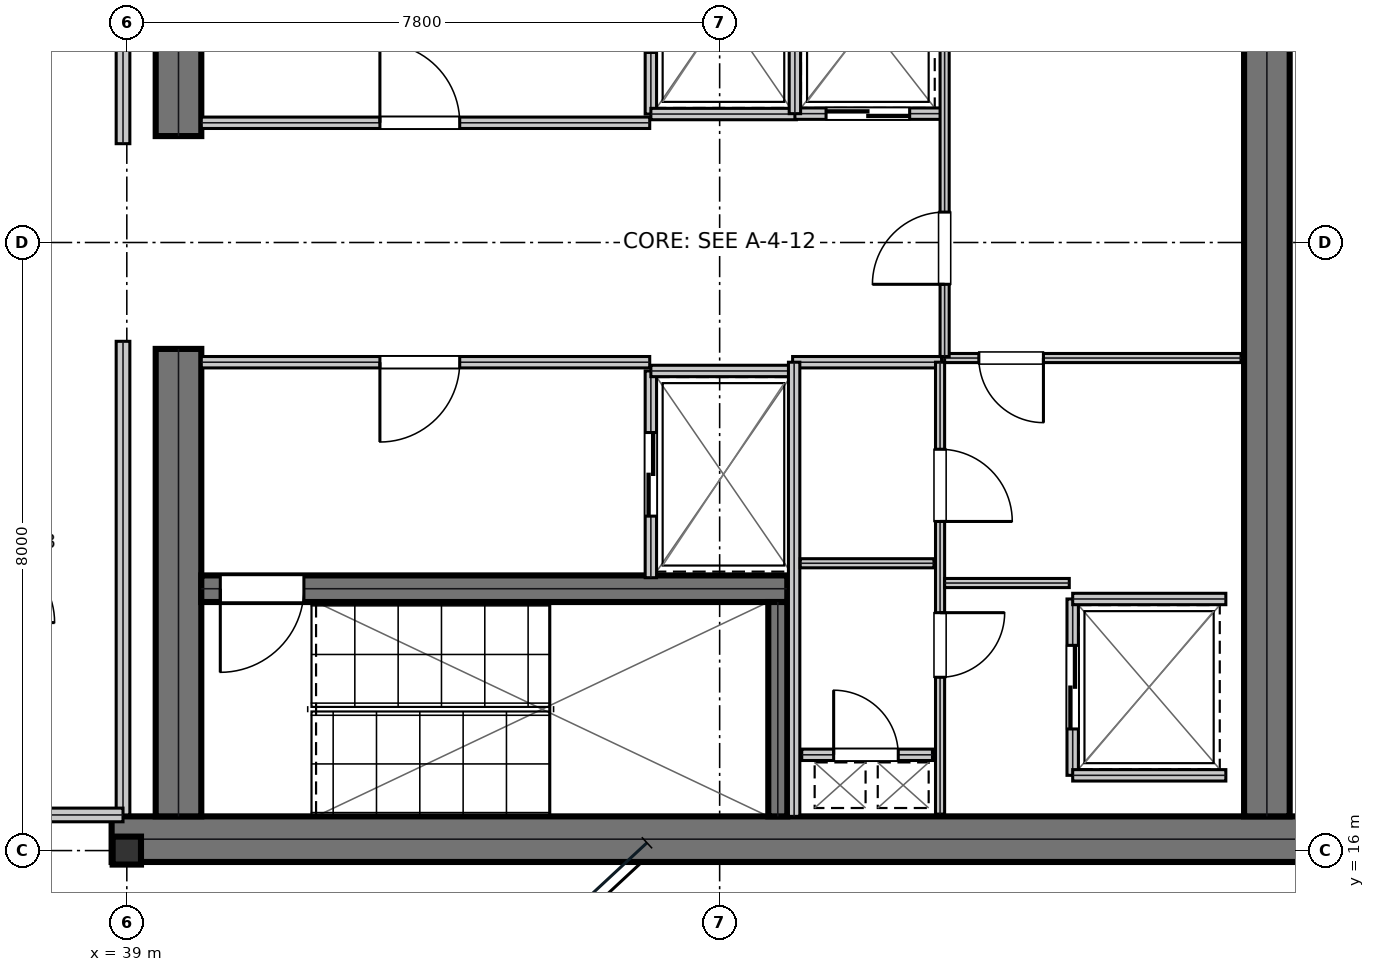
"""IFC4 building model, lengths in metres.
Left out: names, types, materials, properties, quantities, classifications, styles, units other than length and angle.
Written with IfcOpenShell. Run it as: python <this file> out.ifc"""

import sys

from ifc_helpers import new_model, si_unit, direction, frame, frame_2d, origin, origin_2d, place, context, subcontext, project, spatial, rectangle, i_section, extrude, element, fill, save


model = new_model("IFC4")
c1 = context("Model", 3, precision=1e-05, world=origin(), true_north=direction((0.0, 1.0)))
c2 = subcontext(c1, "Body", "Model", "MODEL_VIEW")
j1 = project(units=[si_unit("LENGTHUNIT", "METRE"), si_unit("PLANEANGLEUNIT", "RADIAN")], contexts=[c1])
p1 = place(None, origin())
s1 = spatial("IfcSite", under=j1, at=p1, CompositionType="ELEMENT")
p2 = place(p1, origin())
s2 = spatial("IfcBuilding", under=s1, at=p2, CompositionType="ELEMENT")
p3 = place(p2, frame((0.0, 0.0, 323.55)))
s3 = spatial("IfcBuildingStorey", under=s2, at=p3, CompositionType="ELEMENT", Elevation=323.55)
p4 = place(p3, frame((38.8, 16.15, 0.0), z_axis=(0.0, 0.0, 1.0), x_axis=(1.0, 0.0, 0.0)))
e1 = element("IfcWall", 1, at=p4, inside=s3, PredefinedType="SHEAR", context=c2, shape_type="SweptSolid", body=[
    extrude(rectangle(XDim=16.0, YDim=0.6, at=frame_2d((8.0, 0.0))), origin(), (0.0, 0.0, 1.0), 3.77),
])
for number, where, z_axis, x_axis in (
    (2, (39.68, 16.45, 0.0), (0.0, 0.0, 1.0), (0.0, 1.0, 0.0)),
    (3, (39.68, 25.4, 0.0), (0.0, 0.0, 1.0), (0.0, 1.0, 0.0)),
):
    element("IfcWall", number, at=place(p3, frame(where, z_axis=z_axis, x_axis=x_axis)), inside=s3, PredefinedType="SHEAR", context=c2, shape_type="SweptSolid", body=[
        extrude(rectangle(XDim=6.15, YDim=0.6, at=frame_2d((3.075, 0.0))), origin(), (0.0, 0.0, 1.0), 3.77),
    ])
p5 = place(p3, frame((54.0, 16.45, 0.0), z_axis=(0.0, 0.0, 1.0), x_axis=(0.0, 1.0, 0.0)))
e4 = element("IfcWall", 4, at=p5, inside=s3, PredefinedType="SHEAR", context=c2, shape_type="SweptSolid", body=[
    extrude(rectangle(XDim=15.1, YDim=0.6, at=frame_2d((7.55, 0.0))), origin(), (0.0, 0.0, 1.0), 3.77),
])
p6 = place(p3, frame((39.98, 19.445, 0.0), z_axis=(0.0, 0.0, 1.0), x_axis=(1.0, 0.0, 0.0)))
e5 = element("IfcWall", 5, at=p6, inside=s3, PredefinedType="SHEAR", context=c2, shape_type="SweptSolid", body=[
    extrude(rectangle(XDim=7.71, YDim=0.35, at=frame_2d((3.855, 0.0))), origin(), (0.0, 0.0, 1.0), 3.77),
])
p7 = place(p6, frame((0.25, 0.0, 0.0)))
e6 = element("IfcOpeningElement", 6, at=p7, cuts=e5, PredefinedType="OPENING", context=c2, shape_type="SweptSolid", body=[
    extrude(rectangle(XDim=1.1, YDim=2.15, at=frame_2d((0.55, 1.075))), frame((0.0, 0.185, 0.0), z_axis=(0.0, -1.0, 0.0), x_axis=(1.0, 0.0, 0.0)), (0.0, 0.0, 1.0), 0.37),
])
p8 = place(p3, frame((47.565, 16.45, 0.0), z_axis=(0.0, 0.0, 1.0), x_axis=(0.0, 1.0, 0.0)))
e7 = element("IfcWall", 7, at=p8, inside=s3, PredefinedType="SHEAR", context=c2, shape_type="SweptSolid", body=[
    extrude(rectangle(XDim=2.82, YDim=0.25, at=frame_2d((1.41, 0.0))), origin(), (0.0, 0.0, 1.0), 3.77),
])
p9 = place(p3, frame((39.0, 16.0, 0.0), z_axis=(0.0, 0.0, 1.0), x_axis=(1.0, 0.0, 0.0)))
e8 = element("IfcColumn", 8, at=p9, inside=s3, PredefinedType="COLUMN", context=c2, shape_type="SweptSolid", body=[
    extrude(i_section(OverallWidth=0.373, OverallDepth=0.368, WebThickness=0.015, FlangeThickness=0.024, at=origin_2d()), origin(), (0.0, 0.0, 1.0), 4.044),
])
p10 = place(p3, frame((39.98, 25.575, 0.0), z_axis=(0.0, 0.0, 1.0), x_axis=(1.0, 0.0, 0.0)))
e9 = element("IfcWall", 9, at=p10, inside=s3, PredefinedType="PARTITIONING", context=c2, shape_type="SweptSolid", body=[
    extrude(rectangle(XDim=5.9, YDim=0.15, at=frame_2d((2.95, 0.0))), origin(), (0.0, 0.0, 1.0), 3.77),
])
p11 = place(p10, frame((2.35, 0.0, 0.0)))
e10 = element("IfcOpeningElement", 10, at=p11, cuts=e9, PredefinedType="OPENING", context=c2, shape_type="SweptSolid", body=[
    extrude(rectangle(XDim=1.05, YDim=2.15, at=frame_2d((0.525, 1.075))), frame((0.0, 0.085, 0.0), z_axis=(0.0, -1.0, 0.0), x_axis=(1.0, 0.0, 0.0)), (0.0, 0.0, 1.0), 0.17),
])
p12 = place(p3, frame((39.98, 22.425, 0.0), z_axis=(0.0, 0.0, 1.0), x_axis=(1.0, 0.0, 0.0)))
e11 = element("IfcWall", 11, at=p12, inside=s3, PredefinedType="PARTITIONING", context=c2, shape_type="SweptSolid", body=[
    extrude(rectangle(XDim=5.9, YDim=0.15, at=frame_2d((2.95, 0.0))), origin(), (0.0, 0.0, 1.0), 3.77),
])
p13 = place(p12, frame((2.35, 0.0, 0.0)))
e12 = element("IfcOpeningElement", 12, at=p13, cuts=e11, PredefinedType="OPENING", context=c2, shape_type="SweptSolid", body=[
    extrude(rectangle(XDim=1.05, YDim=2.15, at=frame_2d((0.525, 1.075))), frame((0.0, 0.085, 0.0), z_axis=(0.0, -1.0, 0.0), x_axis=(1.0, 0.0, 0.0)), (0.0, 0.0, 1.0), 0.17),
])
p14 = place(p3, frame((45.895, 25.69, 0.0), z_axis=(0.0, 0.0, 1.0), x_axis=(0.0, 1.0, 0.0)))
e13 = element("IfcWall", 13, at=p14, inside=s3, PredefinedType="PARTITIONING", context=c2, shape_type="SweptSolid", body=[
    extrude(rectangle(XDim=2.72, YDim=0.15, at=frame_2d((1.36, 0.0))), origin(), (0.0, 0.0, 1.0), 3.77),
])
p15 = place(p14, frame((0.81, 0.0, 0.0)))
e14 = element("IfcOpeningElement", 14, at=p15, cuts=e13, PredefinedType="OPENING", context=c2, shape_type="SweptSolid", body=[
    extrude(rectangle(XDim=1.1, YDim=2.15, at=frame_2d((0.55, 1.075))), frame((0.0, 0.085, 0.0), z_axis=(0.0, -1.0, 0.0), x_axis=(1.0, 0.0, 0.0)), (0.0, 0.0, 1.0), 0.17),
])
p16 = place(p3, frame((45.895, 25.69, 0.0), z_axis=(0.0, 0.0, 1.0), x_axis=(1.0, 0.0, 0.0)))
e15 = element("IfcWall", 15, at=p16, inside=s3, PredefinedType="PARTITIONING", context=c2, shape_type="SweptSolid", body=[
    extrude(rectangle(XDim=1.915, YDim=0.15, at=frame_2d((0.958, 0.0))), origin(), (0.0, 0.0, 1.0), 3.77),
])
p17 = place(p3, frame((45.895, 19.59, 0.0), z_axis=(0.0, 0.0, 1.0), x_axis=(0.0, 1.0, 0.0)))
e16 = element("IfcWall", 16, at=p17, inside=s3, PredefinedType="PARTITIONING", context=c2, shape_type="SweptSolid", body=[
    extrude(rectangle(XDim=2.72, YDim=0.15, at=frame_2d((1.36, 0.0))), origin(), (0.0, 0.0, 1.0), 3.77),
])
p18 = place(p17, frame((0.81, 0.0, 0.0)))
e17 = element("IfcOpeningElement", 17, at=p18, cuts=e16, PredefinedType="OPENING", context=c2, shape_type="SweptSolid", body=[
    extrude(rectangle(XDim=1.1, YDim=2.15, at=frame_2d((0.55, 1.075))), frame((0.0, 0.085, 0.0), z_axis=(0.0, -1.0, 0.0), x_axis=(1.0, 0.0, 0.0)), (0.0, 0.0, 1.0), 0.17),
])
p19 = place(p3, frame((45.895, 22.31, 0.0), z_axis=(0.0, 0.0, 1.0), x_axis=(1.0, 0.0, 0.0)))
e18 = element("IfcWall", 18, at=p19, inside=s3, PredefinedType="PARTITIONING", context=c2, shape_type="SweptSolid", body=[
    extrude(rectangle(XDim=1.915, YDim=0.15, at=frame_2d((0.958, 0.0))), origin(), (0.0, 0.0, 1.0), 3.77),
])
p20 = place(p3, frame((47.79, 25.695, 0.0), z_axis=(0.0, 0.0, 1.0), x_axis=(1.0, 0.0, 0.0)))
e19 = element("IfcWall", 19, at=p20, inside=s3, PredefinedType="PARTITIONING", context=c2, shape_type="SweptSolid", body=[
    extrude(rectangle(XDim=1.92, YDim=0.15, at=frame_2d((0.96, 0.0))), origin(), (0.0, 0.0, 1.0), 3.77),
])
p21 = place(p20, frame((0.41, 0.0, 0.0)))
e20 = element("IfcOpeningElement", 20, at=p21, cuts=e19, PredefinedType="OPENING", context=c2, shape_type="SweptSolid", body=[
    extrude(rectangle(XDim=1.1, YDim=2.15, at=frame_2d((0.55, 1.075))), frame((0.0, 0.085, 0.0), z_axis=(0.0, -1.0, 0.0), x_axis=(1.0, 0.0, 0.0)), (0.0, 0.0, 1.0), 0.17),
])
p22 = place(p3, frame((47.79, 25.695, 0.0), z_axis=(0.0, 0.0, 1.0), x_axis=(0.0, 1.0, 0.0)))
e21 = element("IfcWall", 21, at=p22, inside=s3, PredefinedType="PARTITIONING", context=c2, shape_type="SweptSolid", body=[
    extrude(rectangle(XDim=2.415, YDim=0.15, at=frame_2d((1.208, 0.0))), origin(), (0.0, 0.0, 1.0), 3.77),
])
p23 = place(p3, frame((51.445, 16.99, 0.0), z_axis=(0.0, 0.0, 1.0), x_axis=(0.0, 1.0, 0.0)))
e22 = element("IfcWall", 22, at=p23, inside=s3, PredefinedType="PARTITIONING", context=c2, shape_type="SweptSolid", body=[
    extrude(rectangle(XDim=2.32, YDim=0.15, at=frame_2d((1.16, 0.0))), origin(), (0.0, 0.0, 1.0), 3.77),
])
p24 = place(p23, frame((0.61, 0.0, 0.0)))
e23 = element("IfcOpeningElement", 23, at=p24, cuts=e22, PredefinedType="OPENING", context=c2, shape_type="SweptSolid", body=[
    extrude(rectangle(XDim=1.1, YDim=2.15, at=frame_2d((0.55, 1.075))), frame((0.0, 0.085, 0.0), z_axis=(0.0, -1.0, 0.0), x_axis=(1.0, 0.0, 0.0)), (0.0, 0.0, 1.0), 0.17),
])
for number, where, z_axis, x_axis in (
    (24, (51.445, 16.99, 0.0), (0.0, 0.0, 1.0), (1.0, 0.0, 0.0)),
    (25, (51.445, 19.31, 0.0), (0.0, 0.0, 1.0), (1.0, 0.0, 0.0)),
):
    element("IfcWall", number, at=place(p3, frame(where, z_axis=z_axis, x_axis=x_axis)), inside=s3, PredefinedType="PARTITIONING", context=c2, shape_type="SweptSolid", body=[
        extrude(rectangle(XDim=2.015, YDim=0.15, at=frame_2d((1.007, 0.0))), origin(), (0.0, 0.0, 1.0), 3.77),
    ])
p25 = place(p3, frame((47.88, 17.26, 0.0), z_axis=(0.0, 0.0, 1.0), x_axis=(1.0, 0.0, 0.0)))
e26 = element("IfcWall", 26, at=p25, inside=s3, PredefinedType="PARTITIONING", context=c2, shape_type="SweptSolid", body=[
    extrude(rectangle(XDim=1.72, YDim=0.15, at=frame_2d((0.86, 0.0))), origin(), (0.0, 0.0, 1.0), 3.77),
])
p26 = place(p25, frame((0.42, 0.0, 0.0)))
e27 = element("IfcOpeningElement", 27, at=p26, cuts=e26, PredefinedType="OPENING", context=c2, shape_type="SweptSolid", body=[
    extrude(rectangle(XDim=0.85, YDim=2.15, at=frame_2d((0.425, 1.075))), frame((0.0, 0.085, 0.0), z_axis=(0.0, -1.0, 0.0), x_axis=(1.0, 0.0, 0.0)), (0.0, 0.0, 1.0), 0.17),
])
p27 = place(p3, frame((47.76, 22.425, 0.0), z_axis=(0.0, 0.0, 1.0), x_axis=(1.0, 0.0, 0.0)))
e28 = element("IfcWall", 28, at=p27, inside=s3, PredefinedType="PARTITIONING", context=c2, shape_type="SweptSolid", body=[
    extrude(rectangle(XDim=1.96, YDim=0.15, at=frame_2d((0.98, 0.0))), origin(), (0.0, 0.0, 1.0), 3.77),
])
p28 = place(p3, frame((47.78, 16.45, 0.0), z_axis=(0.0, 0.0, 1.0), x_axis=(0.0, 1.0, 0.0)))
e29 = element("IfcWall", 29, at=p28, inside=s3, PredefinedType="PARTITIONING", context=c2, shape_type="SweptSolid", body=[
    extrude(rectangle(XDim=5.975, YDim=0.15, at=frame_2d((2.988, 0.0))), origin(), (0.0, 0.0, 1.0), 3.77),
])
p29 = place(p3, frame((47.86, 19.78, 0.0), z_axis=(0.0, 0.0, 1.0), x_axis=(1.0, 0.0, 0.0)))
e30 = element("IfcWall", 30, at=p29, inside=s3, PredefinedType="PARTITIONING", context=c2, shape_type="SweptSolid", body=[
    extrude(rectangle(XDim=1.76, YDim=0.12, at=frame_2d((0.88, 0.0))), origin(), (0.0, 0.0, 1.0), 3.77),
])
p30 = place(p3, frame((49.7, 16.48, 0.0), z_axis=(0.0, 0.0, 1.0), x_axis=(0.0, 1.0, 0.0)))
e31 = element("IfcWall", 31, at=p30, inside=s3, PredefinedType="PARTITIONING", context=c2, shape_type="SweptSolid", body=[
    extrude(rectangle(XDim=5.945, YDim=0.12, at=frame_2d((2.973, 0.0))), origin(), (0.0, 0.0, 1.0), 3.77),
])
p31 = place(p30, frame((1.8, 0.0, 0.0)))
e32 = element("IfcOpeningElement", 32, at=p31, cuts=e31, PredefinedType="OPENING", context=c2, shape_type="SweptSolid", body=[
    extrude(rectangle(XDim=0.85, YDim=2.15, at=frame_2d((0.425, 1.075))), frame((0.0, 0.07, 0.0), z_axis=(0.0, -1.0, 0.0), x_axis=(1.0, 0.0, 0.0)), (0.0, 0.0, 1.0), 0.14),
])
p32 = place(p30, frame((3.85, 0.0, 0.0)))
e33 = element("IfcOpeningElement", 33, at=p32, cuts=e31, PredefinedType="OPENING", context=c2, shape_type="SweptSolid", body=[
    extrude(rectangle(XDim=0.95, YDim=2.15, at=frame_2d((0.475, 1.075))), frame((0.0, 0.07, 0.0), z_axis=(0.0, -1.0, 0.0), x_axis=(1.0, 0.0, 0.0)), (0.0, 0.0, 1.0), 0.14),
])
p33 = place(p3, frame((49.76, 22.48, 0.0), z_axis=(0.0, 0.0, 1.0), x_axis=(1.0, 0.0, 0.0)))
e34 = element("IfcWall", 34, at=p33, inside=s3, PredefinedType="PARTITIONING", context=c2, shape_type="SweptSolid", body=[
    extrude(rectangle(XDim=3.9, YDim=0.12, at=frame_2d((1.95, 0.0))), origin(), (0.0, 0.0, 1.0), 3.77),
])
p34 = place(p33, frame((0.45, 0.0, 0.0)))
e35 = element("IfcOpeningElement", 35, at=p34, cuts=e34, PredefinedType="OPENING", context=c2, shape_type="SweptSolid", body=[
    extrude(rectangle(XDim=0.85, YDim=2.15, at=frame_2d((0.425, 1.075))), frame((0.0, 0.07, 0.0), z_axis=(0.0, -1.0, 0.0), x_axis=(1.0, 0.0, 0.0)), (0.0, 0.0, 1.0), 0.14),
])
p35 = place(p3, frame((49.76, 19.52, 0.0), z_axis=(0.0, 0.0, 1.0), x_axis=(1.0, 0.0, 0.0)))
e36 = element("IfcWall", 36, at=p35, inside=s3, PredefinedType="PARTITIONING", context=c2, shape_type="SweptSolid", body=[
    extrude(rectangle(XDim=1.64, YDim=0.12, at=frame_2d((0.82, 0.0))), origin(), (0.0, 0.0, 1.0), 3.77),
])
p36 = place(p3, frame((49.76, 22.5, 0.0), z_axis=(0.0, 0.0, 1.0), x_axis=(0.0, 1.0, 0.0)))
e37 = element("IfcWall", 37, at=p36, inside=s3, PredefinedType="PARTITIONING", context=c2, shape_type="SweptSolid", body=[
    extrude(rectangle(XDim=5.72, YDim=0.12, at=frame_2d((2.86, 0.0))), origin(), (0.0, 0.0, 1.0), 3.77),
])
p37 = place(p36, frame((0.95, 0.0, 0.0)))
e38 = element("IfcOpeningElement", 38, at=p37, cuts=e37, PredefinedType="OPENING", context=c2, shape_type="SweptSolid", body=[
    extrude(rectangle(XDim=0.95, YDim=2.15, at=frame_2d((0.475, 1.075))), frame((0.0, 0.07, 0.0), z_axis=(0.0, -1.0, 0.0), x_axis=(1.0, 0.0, 0.0)), (0.0, 0.0, 1.0), 0.14),
])
p38 = place(p3, frame((38.95, 16.469, 0.0), z_axis=(0.0, 0.0, 1.0), x_axis=(0.0, 1.0, 0.0)))
e39 = element("IfcWall", 39, at=p38, inside=s3, PredefinedType="SOLIDWALL", context=c2, shape_type="SweptSolid", body=[
    extrude(rectangle(XDim=6.231, YDim=0.18, at=frame_2d((3.116, 0.0))), origin(), (0.0, 0.0, 1.0), 3.5),
])
p39 = place(p3, frame((37.05, 16.469, 0.0), z_axis=(0.0, 0.0, 1.0), x_axis=(1.0, 0.0, 0.0)))
e40 = element("IfcWall", 40, at=p39, inside=s3, PredefinedType="SOLIDWALL", context=c2, shape_type="SweptSolid", body=[
    extrude(rectangle(XDim=1.9, YDim=0.18, at=frame_2d((0.95, 0.0))), origin(), (0.0, 0.0, 1.0), 3.77),
])
p40 = place(p3, frame((38.95, 25.3, 0.0), z_axis=(0.0, 0.0, 1.0), x_axis=(0.0, 1.0, 0.0)))
e41 = element("IfcWall", 41, at=p40, inside=s3, PredefinedType="SOLIDWALL", context=c2, shape_type="SweptSolid", body=[
    extrude(rectangle(XDim=6.231, YDim=0.18, at=frame_2d((3.116, 0.0))), origin(), (0.0, 0.0, 1.0), 3.5),
])
p41 = place(p11, origin())
e42 = element("IfcDoor", 42, at=p41, inside=s3, OperationType="SINGLE_SWING_LEFT", PredefinedType="DOOR", context=c2, shape_type="SweptSolid", body=[
    extrude(rectangle(XDim=1.05, YDim=2.15, at=frame_2d((0.525, 1.075))), frame((0.0, 0.025, 0.0), z_axis=(0.0, -1.0, 0.0), x_axis=(1.0, 0.0, 0.0)), (0.0, 0.0, 1.0), 0.05),
])
fill(e10, e42)
p42 = place(p13, frame((1.05, 0.0, 0.0), z_axis=(0.0, 0.0, 1.0), x_axis=(-1.0, 0.0, 0.0)))
e43 = element("IfcDoor", 43, at=p42, inside=s3, OperationType="SINGLE_SWING_RIGHT", PredefinedType="DOOR", context=c2, shape_type="SweptSolid", body=[
    extrude(rectangle(XDim=1.05, YDim=2.15, at=frame_2d((0.525, 1.075))), frame((0.0, 0.025, 0.0), z_axis=(0.0, -1.0, 0.0), x_axis=(1.0, 0.0, 0.0)), (0.0, 0.0, 1.0), 0.05),
])
fill(e12, e43)
p43 = place(p18, frame((1.1, 0.0, 0.0), z_axis=(0.0, 0.0, 1.0), x_axis=(-1.0, 0.0, 0.0)))
e44 = element("IfcDoor", 44, at=p43, inside=s3, OperationType="DOUBLE_DOOR_SLIDING", PredefinedType="DOOR", context=c2, shape_type="SweptSolid", body=[
    extrude(rectangle(XDim=1.1, YDim=2.15, at=frame_2d((0.55, 1.075))), frame((0.0, 0.025, 0.0), z_axis=(0.0, -1.0, 0.0), x_axis=(1.0, 0.0, 0.0)), (0.0, 0.0, 1.0), 0.05),
])
fill(e17, e44)
p44 = place(p21, frame((1.1, 0.0, 0.0), z_axis=(0.0, 0.0, 1.0), x_axis=(-1.0, 0.0, 0.0)))
e45 = element("IfcDoor", 45, at=p44, inside=s3, OperationType="DOUBLE_DOOR_SLIDING", PredefinedType="DOOR", context=c2, shape_type="SweptSolid", body=[
    extrude(rectangle(XDim=1.1, YDim=2.15, at=frame_2d((0.55, 1.075))), frame((0.0, 0.025, 0.0), z_axis=(0.0, -1.0, 0.0), x_axis=(1.0, 0.0, 0.0)), (0.0, 0.0, 1.0), 0.05),
])
fill(e20, e45)
p45 = place(p24, frame((1.1, 0.0, 0.0), z_axis=(0.0, 0.0, 1.0), x_axis=(-1.0, 0.0, 0.0)))
e46 = element("IfcDoor", 46, at=p45, inside=s3, OperationType="DOUBLE_DOOR_SLIDING", PredefinedType="DOOR", context=c2, shape_type="SweptSolid", body=[
    extrude(rectangle(XDim=1.1, YDim=2.15, at=frame_2d((0.55, 1.075))), frame((0.0, 0.025, 0.0), z_axis=(0.0, -1.0, 0.0), x_axis=(1.0, 0.0, 0.0)), (0.0, 0.0, 1.0), 0.05),
])
fill(e23, e46)
p46 = place(p26, origin())
e47 = element("IfcDoor", 47, at=p46, inside=s3, OperationType="SINGLE_SWING_LEFT", PredefinedType="TRAPDOOR", context=c2, shape_type="SweptSolid", body=[
    extrude(rectangle(XDim=0.85, YDim=2.15, at=frame_2d((0.425, 1.075))), frame((0.0, 0.025, 0.0), z_axis=(0.0, -1.0, 0.0), x_axis=(1.0, 0.0, 0.0)), (0.0, 0.0, 1.0), 0.05),
])
fill(e27, e47)
p47 = place(p31, frame((0.85, 0.0, 0.0), z_axis=(0.0, 0.0, 1.0), x_axis=(-1.0, 0.0, 0.0)))
e48 = element("IfcDoor", 48, at=p47, inside=s3, OperationType="SINGLE_SWING_LEFT", PredefinedType="DOOR", context=c2, shape_type="SweptSolid", body=[
    extrude(rectangle(XDim=0.85, YDim=2.15, at=frame_2d((0.425, 1.075))), frame((0.0, 0.025, 0.0), z_axis=(0.0, -1.0, 0.0), x_axis=(1.0, 0.0, 0.0)), (0.0, 0.0, 1.0), 0.05),
])
fill(e32, e48)
p48 = place(p32, frame((0.95, 0.0, 0.0), z_axis=(0.0, 0.0, 1.0), x_axis=(-1.0, 0.0, 0.0)))
e49 = element("IfcDoor", 49, at=p48, inside=s3, OperationType="SINGLE_SWING_RIGHT", PredefinedType="DOOR", context=c2, shape_type="SweptSolid", body=[
    extrude(rectangle(XDim=0.95, YDim=2.15, at=frame_2d((0.475, 1.075))), frame((0.0, 0.025, 0.0), z_axis=(0.0, -1.0, 0.0), x_axis=(1.0, 0.0, 0.0)), (0.0, 0.0, 1.0), 0.05),
])
fill(e33, e49)
p49 = place(p34, frame((0.85, 0.0, 0.0), z_axis=(0.0, 0.0, 1.0), x_axis=(-1.0, 0.0, 0.0)))
e50 = element("IfcDoor", 50, at=p49, inside=s3, OperationType="SINGLE_SWING_LEFT", PredefinedType="DOOR", context=c2, shape_type="SweptSolid", body=[
    extrude(rectangle(XDim=0.85, YDim=2.15, at=frame_2d((0.425, 1.075))), frame((0.0, 0.025, 0.0), z_axis=(0.0, -1.0, 0.0), x_axis=(1.0, 0.0, 0.0)), (0.0, 0.0, 1.0), 0.05),
])
fill(e35, e50)
p50 = place(p37, origin())
e51 = element("IfcDoor", 51, at=p50, inside=s3, OperationType="SINGLE_SWING_LEFT", PredefinedType="DOOR", context=c2, shape_type="SweptSolid", body=[
    extrude(rectangle(XDim=0.95, YDim=2.15, at=frame_2d((0.475, 1.075))), frame((0.0, 0.025, 0.0), z_axis=(0.0, -1.0, 0.0), x_axis=(1.0, 0.0, 0.0)), (0.0, 0.0, 1.0), 0.05),
])
fill(e38, e51)
p51 = place(p7, frame((1.1, 0.0, 0.0), z_axis=(0.0, 0.0, 1.0), x_axis=(-1.0, 0.0, 0.0)))
e52 = element("IfcDoor", 52, at=p51, inside=s3, OperationType="SINGLE_SWING_RIGHT", PredefinedType="DOOR", context=c2, shape_type="SweptSolid", body=[
    extrude(rectangle(XDim=1.1, YDim=2.15, at=frame_2d((0.55, 1.075))), frame((0.0, 0.025, 0.0), z_axis=(0.0, -1.0, 0.0), x_axis=(1.0, 0.0, 0.0)), (0.0, 0.0, 1.0), 0.05),
])
fill(e6, e52)
save(model, sys.argv[1])
